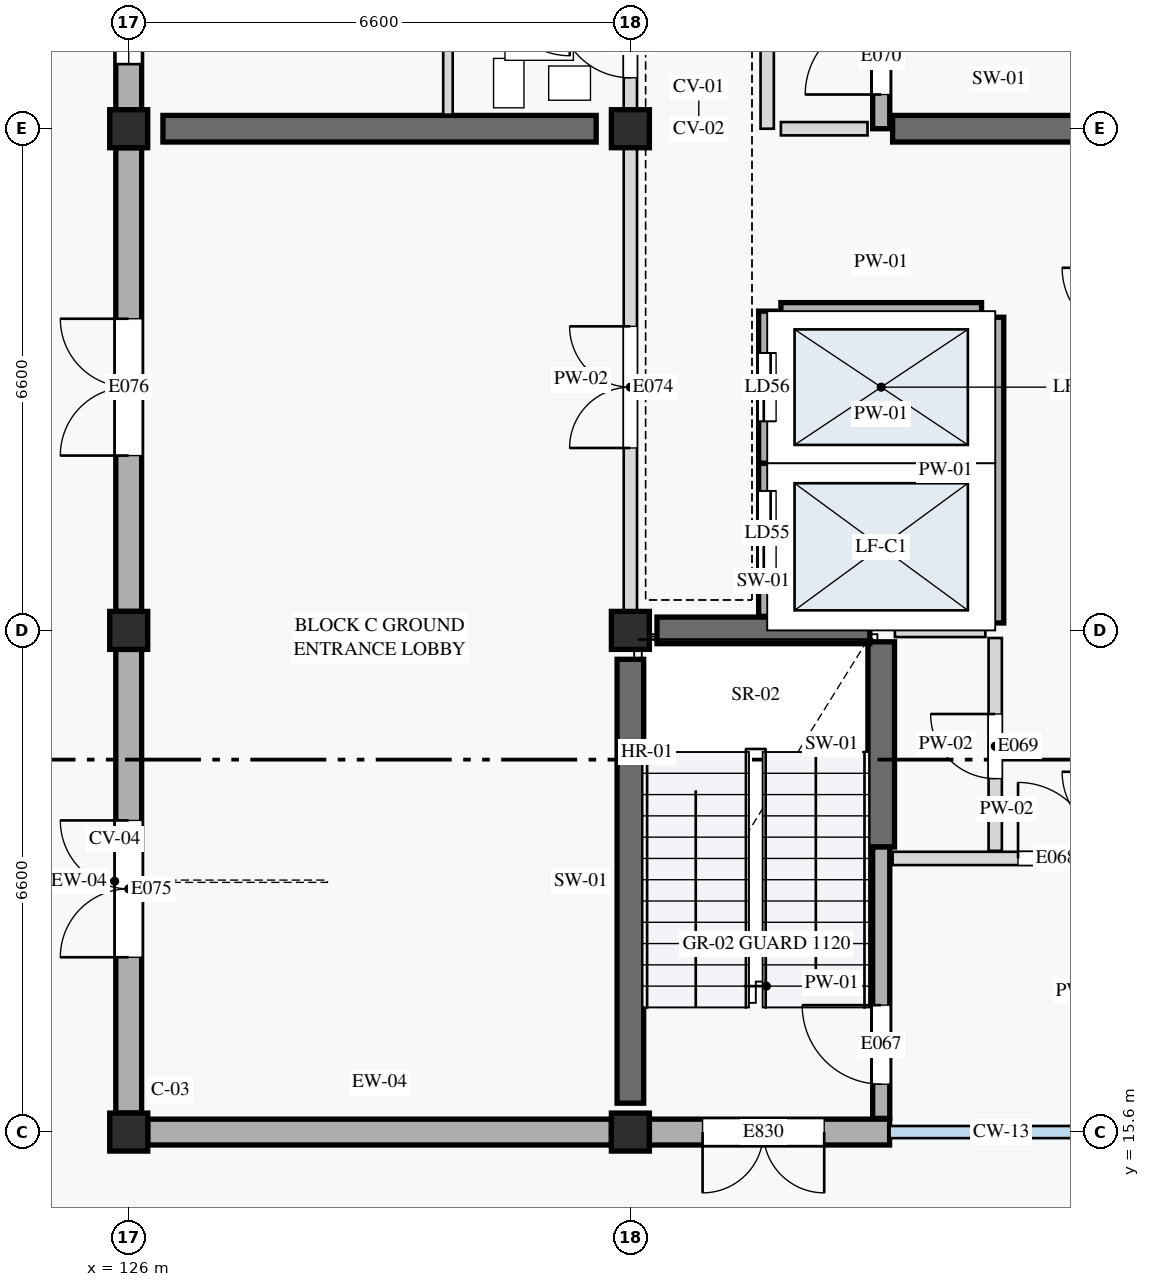
"""IFC4 building model, lengths in metres.
Left out: names, types, materials, properties, quantities, classifications, styles, units other than length and angle.
Written with IfcOpenShell. Run it as: python <this file> out.ifc"""

import sys

from ifc_helpers import new_model, si_unit, direction, frame, frame_2d, origin, origin_2d, place, context, subcontext, project, spatial, rectangle, extrude, element, fill, save


model = new_model("IFC4")
c1 = context("Model", 3, precision=1e-05, world=origin(), true_north=direction((0.0, 1.0)))
c2 = subcontext(c1, "Body", "Model", "MODEL_VIEW")
j1 = project(units=[si_unit("LENGTHUNIT", "METRE"), si_unit("PLANEANGLEUNIT", "RADIAN")], contexts=[c1])
p1 = place(None, origin())
s1 = spatial("IfcSite", under=j1, at=p1, CompositionType="ELEMENT")
p2 = place(p1, origin())
s2 = spatial("IfcBuilding", under=s1, at=p2, CompositionType="ELEMENT")
p3 = place(p2, origin())
s3 = spatial("IfcBuildingStorey", under=s2, at=p3, CompositionType="ELEMENT", Elevation=0.0)
for number, where, z_axis, x_axis in (
    (1, (126.0, 15.6, 0.0), (0.0, 0.0, 1.0), (1.0, 0.0, 0.0)),
    (2, (132.6, 15.6, 0.0), (0.0, 0.0, 1.0), (1.0, 0.0, 0.0)),
    (3, (126.0, 22.2, 0.0), (0.0, 0.0, 1.0), (1.0, 0.0, 0.0)),
    (4, (132.6, 22.2, 0.0), (0.0, 0.0, 1.0), (1.0, 0.0, 0.0)),
    (5, (126.0, 28.8, 0.0), (0.0, 0.0, 1.0), (1.0, 0.0, 0.0)),
    (6, (132.6, 28.8, 0.0), (0.0, 0.0, 1.0), (1.0, 0.0, 0.0)),
):
    element("IfcColumn", number, at=place(p3, frame(where, z_axis=z_axis, x_axis=x_axis)), inside=s3, PredefinedType="COLUMN", context=c2, shape_type="SweptSolid", body=[
        extrude(rectangle(XDim=0.5, YDim=0.5, at=origin_2d()), origin(), (0.0, 0.0, 1.0), 4.2),
    ])
p4 = place(p3, frame((132.6, 15.98, 0.0), z_axis=(0.0, 0.0, 1.0), x_axis=(0.0, 1.0, 0.0)))
e7 = element("IfcWall", 7, at=p4, inside=s3, PredefinedType="SHEAR", context=c2, shape_type="SweptSolid", body=[
    extrude(rectangle(XDim=5.84, YDim=0.35, at=frame_2d((2.92, 0.0))), origin(), (0.0, 0.0, 1.0), 3.92),
])
p5 = place(p3, frame((135.9, 19.35, 0.0), z_axis=(0.0, 0.0, 1.0), x_axis=(0.0, 1.0, 0.0)))
e8 = element("IfcWall", 8, at=p5, inside=s3, PredefinedType="SHEAR", context=c2, shape_type="SweptSolid", body=[
    extrude(rectangle(XDim=2.7, YDim=0.35, at=frame_2d((1.35, 0.0))), origin(), (0.0, 0.0, 1.0), 3.92),
])
for number, where, z_axis, x_axis in (
    (9, (132.95, 22.2, 0.0), (0.0, 0.0, 1.0), (1.0, 0.0, 0.0)),
    (10, (136.05, 28.8, 0.0), (0.0, 0.0, 1.0), (1.0, 0.0, 0.0)),
):
    element("IfcWall", number, at=place(p3, frame(where, z_axis=z_axis, x_axis=x_axis)), inside=s3, PredefinedType="SHEAR", context=c2, shape_type="SweptSolid", body=[
        extrude(rectangle(XDim=2.8, YDim=0.35, at=frame_2d((1.4, 0.0))), origin(), (0.0, 0.0, 1.0), 3.92),
    ])
p6 = place(p3, frame((126.45, 28.8, 0.0), z_axis=(0.0, 0.0, 1.0), x_axis=(1.0, 0.0, 0.0)))
e11 = element("IfcWall", 11, at=p6, inside=s3, PredefinedType="SHEAR", context=c2, shape_type="SweptSolid", body=[
    extrude(rectangle(XDim=5.7, YDim=0.35, at=frame_2d((2.85, 0.0))), origin(), (0.0, 0.0, 1.0), 3.92),
])
p7 = place(p3, frame((126.0, 15.85, 0.0), z_axis=(0.0, 0.0, 1.0), x_axis=(0.0, 1.0, 0.0)))
e12 = element("IfcWall", 12, at=p7, inside=s3, PredefinedType="STANDARD", context=c2, shape_type="SweptSolid", body=[
    extrude(rectangle(XDim=6.1, YDim=0.34, at=frame_2d((3.05, 0.0))), origin(), (0.0, 0.0, 1.0), 3.6),
])
p8 = place(p7, frame((2.05, 0.0, 0.0)))
e13 = element("IfcOpeningElement", 13, at=p8, cuts=e12, PredefinedType="OPENING", context=c2, shape_type="SweptSolid", body=[
    extrude(rectangle(XDim=1.8, YDim=2.4, at=frame_2d((0.9, 1.2))), frame((0.0, 0.18, 0.0), z_axis=(0.0, -1.0, 0.0), x_axis=(1.0, 0.0, 0.0)), (0.0, 0.0, 1.0), 0.36),
])
p9 = place(p3, frame((126.0, 22.45, 0.0), z_axis=(0.0, 0.0, 1.0), x_axis=(0.0, 1.0, 0.0)))
e14 = element("IfcWall", 14, at=p9, inside=s3, PredefinedType="STANDARD", context=c2, shape_type="SweptSolid", body=[
    extrude(rectangle(XDim=6.1, YDim=0.34, at=frame_2d((3.05, 0.0))), origin(), (0.0, 0.0, 1.0), 3.6),
])
p10 = place(p9, frame((2.05, 0.0, 0.0)))
e15 = element("IfcOpeningElement", 15, at=p10, cuts=e14, PredefinedType="OPENING", context=c2, shape_type="SweptSolid", body=[
    extrude(rectangle(XDim=1.8, YDim=2.4, at=frame_2d((0.9, 1.2))), frame((0.0, 0.18, 0.0), z_axis=(0.0, -1.0, 0.0), x_axis=(1.0, 0.0, 0.0)), (0.0, 0.0, 1.0), 0.36),
])
p11 = place(p3, frame((126.0, 29.05, 0.0), z_axis=(0.0, 0.0, 1.0), x_axis=(0.0, 1.0, 0.0)))
e16 = element("IfcWall", 16, at=p11, inside=s3, PredefinedType="STANDARD", context=c2, shape_type="SweptSolid", body=[
    extrude(rectangle(XDim=6.1, YDim=0.34, at=frame_2d((3.05, 0.0))), origin(), (0.0, 0.0, 1.0), 3.6),
])
p12 = place(p11, frame((0.6, 0.0, 0.85)))
e17 = element("IfcOpeningElement", 17, at=p12, cuts=e16, PredefinedType="OPENING", context=c2, shape_type="SweptSolid", body=[
    extrude(rectangle(XDim=1.8, YDim=1.35, at=frame_2d((0.9, 0.675))), frame((0.0, 0.18, 0.0), z_axis=(0.0, -1.0, 0.0), x_axis=(1.0, 0.0, 0.0)), (0.0, 0.0, 1.0), 0.36),
])
p13 = place(p11, frame((4.0, 0.0, 0.85)))
e18 = element("IfcOpeningElement", 18, at=p13, cuts=e16, PredefinedType="OPENING", context=c2, shape_type="SweptSolid", body=[
    extrude(rectangle(XDim=1.5, YDim=1.35, at=frame_2d((0.75, 0.675))), frame((0.0, 0.18, 0.0), z_axis=(0.0, -1.0, 0.0), x_axis=(1.0, 0.0, 0.0)), (0.0, 0.0, 1.0), 0.36),
])
p14 = place(p3, frame((126.25, 15.6, 0.0), z_axis=(0.0, 0.0, 1.0), x_axis=(1.0, 0.0, 0.0)))
e19 = element("IfcWall", 19, at=p14, inside=s3, PredefinedType="STANDARD", context=c2, shape_type="SweptSolid", body=[
    extrude(rectangle(XDim=6.1, YDim=0.34, at=frame_2d((3.05, 0.0))), origin(), (0.0, 0.0, 1.0), 3.65),
])
p15 = place(p3, frame((136.01, 15.6, 0.0), z_axis=(0.0, 0.0, 1.0), x_axis=(-1.0, 0.0, 0.0)))
e20 = element("IfcWall", 20, at=p15, inside=s3, PredefinedType="STANDARD", context=c2, shape_type="SweptSolid", body=[
    extrude(rectangle(XDim=3.16, YDim=0.34, at=frame_2d((1.58, 0.0))), origin(), (0.0, 0.0, 1.0), 3.65),
])
p16 = place(p15, frame((0.86, 0.0, 0.0)))
e21 = element("IfcOpeningElement", 21, at=p16, cuts=e20, PredefinedType="OPENING", context=c2, shape_type="SweptSolid", body=[
    extrude(rectangle(XDim=1.6, YDim=2.4, at=frame_2d((0.8, 1.2))), frame((0.0, 0.18, 0.0), z_axis=(0.0, -1.0, 0.0), x_axis=(1.0, 0.0, 0.0)), (0.0, 0.0, 1.0), 0.36),
])
p17 = place(p3, frame((135.9, 15.78, 0.0), z_axis=(0.0, 0.0, 1.0), x_axis=(0.0, 1.0, 0.0)))
e22 = element("IfcWall", 22, at=p17, inside=s3, PredefinedType="STANDARD", context=c2, shape_type="SweptSolid", body=[
    extrude(rectangle(XDim=3.57, YDim=0.225, at=frame_2d((1.785, 0.0))), origin(), (0.0, 0.0, 1.0), 3.92),
])
p18 = place(p17, frame((0.45, 0.0, 0.0)))
e23 = element("IfcOpeningElement", 23, at=p18, cuts=e22, PredefinedType="OPENING", context=c2, shape_type="SweptSolid", body=[
    extrude(rectangle(XDim=1.04, YDim=2.12, at=frame_2d((0.52, 1.06))), frame((0.0, 0.123, 0.0), z_axis=(0.0, -1.0, 0.0), x_axis=(1.0, 0.0, 0.0)), (0.0, 0.0, 1.0), 0.245),
])
p19 = place(p3, frame((136.05, 19.2, 0.0), z_axis=(0.0, 0.0, 1.0), x_axis=(1.0, 0.0, 0.0)))
e24 = element("IfcWall", 24, at=p19, inside=s3, PredefinedType="PARTITIONING", context=c2, shape_type="SweptSolid", body=[
    extrude(rectangle(XDim=3.0, YDim=0.175, at=frame_2d((1.5, 0.0))), origin(), (0.0, 0.0, 1.0), 3.92),
])
p20 = place(p19, frame((1.65, 0.0, 0.0)))
e25 = element("IfcOpeningElement", 25, at=p20, cuts=e24, PredefinedType="OPENING", context=c2, shape_type="SweptSolid", body=[
    extrude(rectangle(XDim=1.0, YDim=2.1, at=frame_2d((0.5, 1.05))), frame((0.0, 0.097, 0.0), z_axis=(0.0, -1.0, 0.0), x_axis=(1.0, 0.0, 0.0)), (0.0, 0.0, 1.0), 0.195),
])
p21 = place(p3, frame((137.4, 19.3, 0.0), z_axis=(0.0, 0.0, 1.0), x_axis=(0.0, 1.0, 0.0)))
e26 = element("IfcWall", 26, at=p21, inside=s3, PredefinedType="PARTITIONING", context=c2, shape_type="SweptSolid", body=[
    extrude(rectangle(XDim=2.8, YDim=0.175, at=frame_2d((1.4, 0.0))), origin(), (0.0, 0.0, 1.0), 3.92),
])
p22 = place(p21, frame((0.95, 0.0, 0.0)))
e27 = element("IfcOpeningElement", 27, at=p22, cuts=e26, PredefinedType="OPENING", context=c2, shape_type="SweptSolid", body=[
    extrude(rectangle(XDim=0.85, YDim=2.0, at=frame_2d((0.425, 1.0))), frame((0.0, 0.097, 0.0), z_axis=(0.0, -1.0, 0.0), x_axis=(1.0, 0.0, 0.0)), (0.0, 0.0, 1.0), 0.195),
])
p23 = place(p3, frame((136.08, 22.2, 0.0), z_axis=(0.0, 0.0, 1.0), x_axis=(1.0, 0.0, 0.0)))
e28 = element("IfcWall", 28, at=p23, inside=s3, PredefinedType="PARTITIONING", context=c2, shape_type="SweptSolid", body=[
    extrude(rectangle(XDim=1.19, YDim=0.175, at=frame_2d((0.595, 0.0))), origin(), (0.0, 0.0, 1.0), 3.92),
])
p24 = place(p3, frame((134.4, 22.385, 0.0), z_axis=(0.0, 0.0, 1.0), x_axis=(0.0, 1.0, 0.0)))
e29 = element("IfcWall", 29, at=p24, inside=s3, PredefinedType="STANDARD", context=c2, shape_type="SweptSolid", body=[
    extrude(rectangle(XDim=2.015, YDim=0.225, at=frame_2d((1.007, 0.0))), origin(), (0.0, 0.0, 1.0), 3.92),
])
p25 = place(p24, frame((0.55, 0.0, 0.0)))
e30 = element("IfcOpeningElement", 30, at=p25, cuts=e29, PredefinedType="OPENING", context=c2, shape_type="SweptSolid", body=[
    extrude(rectangle(XDim=1.1, YDim=2.1, at=frame_2d((0.55, 1.05))), frame((0.0, 0.123, 0.0), z_axis=(0.0, -1.0, 0.0), x_axis=(1.0, 0.0, 0.0)), (0.0, 0.0, 1.0), 0.245),
])
p26 = place(p3, frame((134.4, 24.4, 0.0), z_axis=(0.0, 0.0, 1.0), x_axis=(0.0, 1.0, 0.0)))
e31 = element("IfcWall", 31, at=p26, inside=s3, PredefinedType="STANDARD", context=c2, shape_type="SweptSolid", body=[
    extrude(rectangle(XDim=2.0, YDim=0.225, at=frame_2d((1.0, 0.0))), origin(), (0.0, 0.0, 1.0), 3.92),
])
p27 = place(p26, frame((0.55, 0.0, 0.0)))
e32 = element("IfcOpeningElement", 32, at=p27, cuts=e31, PredefinedType="OPENING", context=c2, shape_type="SweptSolid", body=[
    extrude(rectangle(XDim=0.9, YDim=2.1, at=frame_2d((0.45, 1.05))), frame((0.0, 0.123, 0.0), z_axis=(0.0, -1.0, 0.0), x_axis=(1.0, 0.0, 0.0)), (0.0, 0.0, 1.0), 0.245),
])
p28 = place(p3, frame((137.4, 22.298, 0.0), z_axis=(0.0, 0.0, 1.0), x_axis=(0.0, 1.0, 0.0)))
e33 = element("IfcWall", 33, at=p28, inside=s3, PredefinedType="STANDARD", context=c2, shape_type="SweptSolid", body=[
    extrude(rectangle(XDim=4.022, YDim=0.225, at=frame_2d((2.011, 0.0))), origin(), (0.0, 0.0, 1.0), 3.92),
])
for number, where, z_axis, x_axis in (
    (34, (134.58, 24.4, 0.0), (0.0, 0.0, 1.0), (1.0, 0.0, 0.0)),
    (35, (134.58, 26.4, 0.0), (0.0, 0.0, 1.0), (1.0, 0.0, 0.0)),
):
    element("IfcWall", number, at=place(p3, frame(where, z_axis=z_axis, x_axis=x_axis)), inside=s3, PredefinedType="STANDARD", context=c2, shape_type="SweptSolid", body=[
        extrude(rectangle(XDim=2.64, YDim=0.225, at=frame_2d((1.32, 0.0))), origin(), (0.0, 0.0, 1.0), 3.92),
    ])
p29 = place(p3, frame((135.9, 28.8, 0.0), z_axis=(0.0, 0.0, 1.0), x_axis=(0.0, 1.0, 0.0)))
e36 = element("IfcWall", 36, at=p29, inside=s3, PredefinedType="STANDARD", context=c2, shape_type="SweptSolid", body=[
    extrude(rectangle(XDim=3.45, YDim=0.225, at=frame_2d((1.725, 0.0))), origin(), (0.0, 0.0, 1.0), 3.92),
])
p30 = place(p29, frame((0.45, 0.0, 0.0)))
e37 = element("IfcOpeningElement", 37, at=p30, cuts=e36, PredefinedType="OPENING", context=c2, shape_type="SweptSolid", body=[
    extrude(rectangle(XDim=1.0, YDim=2.16, at=frame_2d((0.5, 1.08))), frame((0.0, 0.123, 0.0), z_axis=(0.0, -1.0, 0.0), x_axis=(1.0, 0.0, 0.0)), (0.0, 0.0, 1.0), 0.245),
])
p31 = place(p3, frame((134.4, 28.8, 0.0), z_axis=(0.0, 0.0, 1.0), x_axis=(0.0, 1.0, 0.0)))
e38 = element("IfcWall", 38, at=p31, inside=s3, PredefinedType="PARTITIONING", context=c2, shape_type="SweptSolid", body=[
    extrude(rectangle(XDim=3.3, YDim=0.175, at=frame_2d((1.65, 0.0))), origin(), (0.0, 0.0, 1.0), 3.92),
])
p32 = place(p31, frame((1.8, 0.0, 0.0)))
e39 = element("IfcOpeningElement", 39, at=p32, cuts=e38, PredefinedType="OPENING", context=c2, shape_type="SweptSolid", body=[
    extrude(rectangle(XDim=1.04, YDim=2.12, at=frame_2d((0.52, 1.06))), frame((0.0, 0.097, 0.0), z_axis=(0.0, -1.0, 0.0), x_axis=(1.0, 0.0, 0.0)), (0.0, 0.0, 1.0), 0.195),
])
p33 = place(p3, frame((134.58, 28.8, 0.0), z_axis=(0.0, 0.0, 1.0), x_axis=(1.0, 0.0, 0.0)))
e40 = element("IfcWall", 40, at=p33, inside=s3, PredefinedType="PARTITIONING", context=c2, shape_type="SweptSolid", body=[
    extrude(rectangle(XDim=1.14, YDim=0.175, at=frame_2d((0.57, 0.0))), origin(), (0.0, 0.0, 1.0), 3.75),
])
p34 = place(p3, frame((132.6, 22.2, 0.0), z_axis=(0.0, 0.0, 1.0), x_axis=(0.0, 1.0, 0.0)))
e41 = element("IfcWall", 41, at=p34, inside=s3, PredefinedType="PARTITIONING", context=c2, shape_type="SweptSolid", body=[
    extrude(rectangle(XDim=6.6, YDim=0.175, at=frame_2d((3.3, 0.0))), origin(), (0.0, 0.0, 1.0), 3.55),
])
p35 = place(p34, frame((2.4, 0.0, 0.0)))
e42 = element("IfcOpeningElement", 42, at=p35, cuts=e41, PredefinedType="OPENING", context=c2, shape_type="SweptSolid", body=[
    extrude(rectangle(XDim=1.6, YDim=2.2, at=frame_2d((0.8, 1.1))), frame((0.0, 0.097, 0.0), z_axis=(0.0, -1.0, 0.0), x_axis=(1.0, 0.0, 0.0)), (0.0, 0.0, 1.0), 0.195),
])
p36 = place(p3, frame((132.6, 28.8, 0.0), z_axis=(0.0, 0.0, 1.0), x_axis=(0.0, 1.0, 0.0)))
e43 = element("IfcWall", 43, at=p36, inside=s3, PredefinedType="PARTITIONING", context=c2, shape_type="SweptSolid", body=[
    extrude(rectangle(XDim=13.2, YDim=0.175, at=frame_2d((6.6, 0.0))), origin(), (0.0, 0.0, 1.0), 3.55),
])
p37 = place(p36, frame((0.67, 0.0, 0.0)))
e44 = element("IfcOpeningElement", 44, at=p37, cuts=e43, PredefinedType="OPENING", context=c2, shape_type="SweptSolid", body=[
    extrude(rectangle(XDim=0.95, YDim=2.1, at=frame_2d((0.475, 1.05))), frame((0.0, 0.097, 0.0), z_axis=(0.0, -1.0, 0.0), x_axis=(1.0, 0.0, 0.0)), (0.0, 0.0, 1.0), 0.195),
])
p38 = place(p3, frame((130.2, 28.985, 0.0), z_axis=(0.0, 0.0, 1.0), x_axis=(0.0, 1.0, 0.0)))
e45 = element("IfcWall", 45, at=p38, inside=s3, PredefinedType="PARTITIONING", context=c2, shape_type="SweptSolid", body=[
    extrude(rectangle(XDim=1.635, YDim=0.125, at=frame_2d((0.817, 0.0))), origin(), (0.0, 0.0, 1.0), 3.92),
])
p39 = place(p12, origin())
e46 = element("IfcWindow", 46, at=p39, inside=s3, PartitioningType="SINGLE_PANEL", PredefinedType="WINDOW", context=c2, shape_type="SweptSolid", body=[
    extrude(rectangle(XDim=1.8, YDim=1.35, at=frame_2d((0.9, 0.675))), frame((0.0, 0.03, 0.0), z_axis=(0.0, -1.0, 0.0), x_axis=(1.0, 0.0, 0.0)), (0.0, 0.0, 1.0), 0.06),
])
fill(e17, e46)
p40 = place(p8, origin())
e47 = element("IfcDoor", 47, at=p40, inside=s3, OperationType="DOUBLE_DOOR_SINGLE_SWING", PredefinedType="DOOR", context=c2, shape_type="SweptSolid", body=[
    extrude(rectangle(XDim=1.8, YDim=2.4, at=frame_2d((0.9, 1.2))), frame((0.0, 0.025, 0.0), z_axis=(0.0, -1.0, 0.0), x_axis=(1.0, 0.0, 0.0)), (0.0, 0.0, 1.0), 0.05),
])
fill(e13, e47)
p41 = place(p10, origin())
e48 = element("IfcDoor", 48, at=p41, inside=s3, OperationType="DOUBLE_DOOR_SINGLE_SWING", PredefinedType="DOOR", context=c2, shape_type="SweptSolid", body=[
    extrude(rectangle(XDim=1.8, YDim=2.4, at=frame_2d((0.9, 1.2))), frame((0.0, 0.025, 0.0), z_axis=(0.0, -1.0, 0.0), x_axis=(1.0, 0.0, 0.0)), (0.0, 0.0, 1.0), 0.05),
])
fill(e15, e48)
p42 = place(p16, origin())
e49 = element("IfcDoor", 49, at=p42, inside=s3, OperationType="DOUBLE_DOOR_SINGLE_SWING", PredefinedType="DOOR", context=c2, shape_type="SweptSolid", body=[
    extrude(rectangle(XDim=1.6, YDim=2.4, at=frame_2d((0.8, 1.2))), frame((0.0, 0.025, 0.0), z_axis=(0.0, -1.0, 0.0), x_axis=(1.0, 0.0, 0.0)), (0.0, 0.0, 1.0), 0.05),
])
fill(e21, e49)
p43 = place(p18, origin())
e50 = element("IfcDoor", 50, at=p43, inside=s3, OperationType="SINGLE_SWING_RIGHT", PredefinedType="DOOR", context=c2, shape_type="SweptSolid", body=[
    extrude(rectangle(XDim=1.04, YDim=2.12, at=frame_2d((0.52, 1.06))), frame((0.0, 0.025, 0.0), z_axis=(0.0, -1.0, 0.0), x_axis=(1.0, 0.0, 0.0)), (0.0, 0.0, 1.0), 0.05),
])
fill(e23, e50)
p44 = place(p20, origin())
e51 = element("IfcDoor", 51, at=p44, inside=s3, OperationType="SINGLE_SWING_LEFT", PredefinedType="DOOR", context=c2, shape_type="SweptSolid", body=[
    extrude(rectangle(XDim=1.0, YDim=2.1, at=frame_2d((0.5, 1.05))), frame((0.0, 0.025, 0.0), z_axis=(0.0, -1.0, 0.0), x_axis=(1.0, 0.0, 0.0)), (0.0, 0.0, 1.0), 0.05),
])
fill(e25, e51)
p45 = place(p22, origin())
e52 = element("IfcDoor", 52, at=p45, inside=s3, OperationType="SINGLE_SWING_RIGHT", PredefinedType="DOOR", context=c2, shape_type="SweptSolid", body=[
    extrude(rectangle(XDim=0.85, YDim=2.0, at=frame_2d((0.425, 1.0))), frame((0.0, 0.025, 0.0), z_axis=(0.0, -1.0, 0.0), x_axis=(1.0, 0.0, 0.0)), (0.0, 0.0, 1.0), 0.05),
])
fill(e27, e52)
p46 = place(p25, origin())
e53 = element("IfcDoor", 53, at=p46, inside=s3, OperationType="DOUBLE_DOOR_SLIDING", PredefinedType="DOOR", context=c2, shape_type="SweptSolid", body=[
    extrude(rectangle(XDim=1.1, YDim=2.1, at=frame_2d((0.55, 1.05))), frame((0.0, 0.025, 0.0), z_axis=(0.0, -1.0, 0.0), x_axis=(1.0, 0.0, 0.0)), (0.0, 0.0, 1.0), 0.05),
])
fill(e30, e53)
p47 = place(p27, origin())
e54 = element("IfcDoor", 54, at=p47, inside=s3, OperationType="DOUBLE_DOOR_SLIDING", PredefinedType="DOOR", context=c2, shape_type="SweptSolid", body=[
    extrude(rectangle(XDim=0.9, YDim=2.1, at=frame_2d((0.45, 1.05))), frame((0.0, 0.025, 0.0), z_axis=(0.0, -1.0, 0.0), x_axis=(1.0, 0.0, 0.0)), (0.0, 0.0, 1.0), 0.05),
])
fill(e32, e54)
p48 = place(p30, origin())
e55 = element("IfcDoor", 55, at=p48, inside=s3, OperationType="SINGLE_SWING_LEFT", PredefinedType="DOOR", context=c2, shape_type="SweptSolid", body=[
    extrude(rectangle(XDim=1.0, YDim=2.16, at=frame_2d((0.5, 1.08))), frame((0.0, 0.025, 0.0), z_axis=(0.0, -1.0, 0.0), x_axis=(1.0, 0.0, 0.0)), (0.0, 0.0, 1.0), 0.05),
])
fill(e37, e55)
p49 = place(p35, origin())
e56 = element("IfcDoor", 56, at=p49, inside=s3, OperationType="DOUBLE_DOOR_SINGLE_SWING", PredefinedType="DOOR", context=c2, shape_type="SweptSolid", body=[
    extrude(rectangle(XDim=1.6, YDim=2.2, at=frame_2d((0.8, 1.1))), frame((0.0, 0.025, 0.0), z_axis=(0.0, -1.0, 0.0), x_axis=(1.0, 0.0, 0.0)), (0.0, 0.0, 1.0), 0.05),
])
fill(e42, e56)
p50 = place(p37, origin())
e57 = element("IfcDoor", 57, at=p50, inside=s3, OperationType="SINGLE_SWING_RIGHT", PredefinedType="DOOR", context=c2, shape_type="SweptSolid", body=[
    extrude(rectangle(XDim=0.95, YDim=2.1, at=frame_2d((0.475, 1.05))), frame((0.0, 0.025, 0.0), z_axis=(0.0, -1.0, 0.0), x_axis=(1.0, 0.0, 0.0)), (0.0, 0.0, 1.0), 0.05),
])
fill(e44, e57)
save(model, sys.argv[1])
